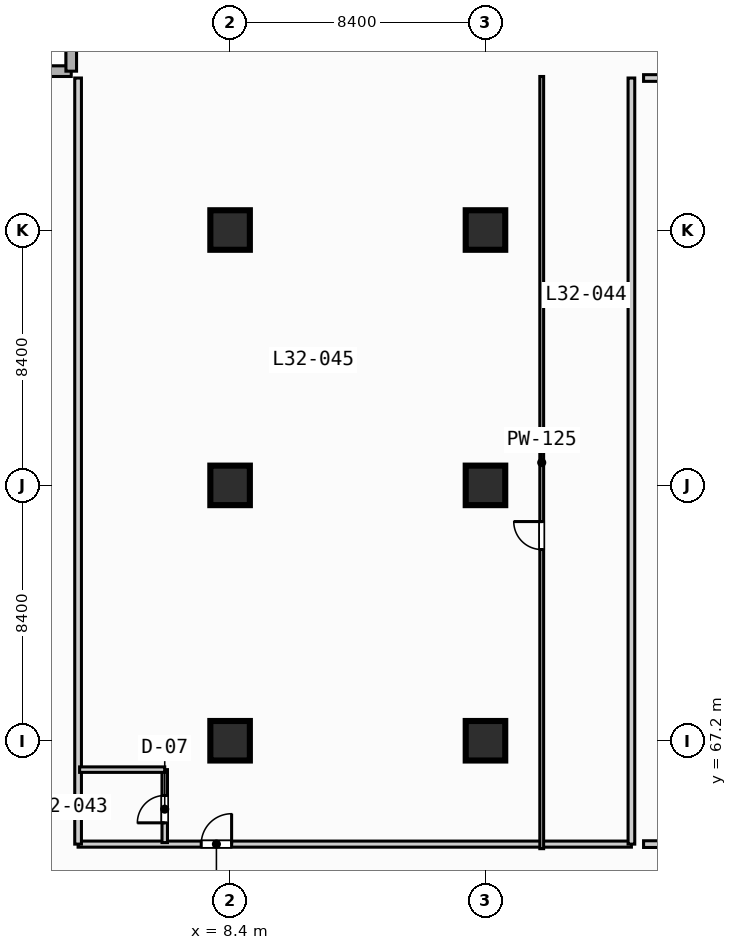
"""IFC4 building model, lengths in metres.
Left out: names, types, materials, properties, quantities, classifications, styles, units other than length and angle.
Written with IfcOpenShell. Run it as: python <this file> out.ifc"""

import sys

from ifc_helpers import new_model, si_unit, direction, frame, frame_2d, origin, origin_2d, place, context, subcontext, project, spatial, rectangle, extrude, element, fill, save


model = new_model("IFC4")
c1 = context("Model", 3, precision=1e-05, world=origin(), true_north=direction((0.0, 1.0)))
c2 = subcontext(c1, "Body", "Model", "MODEL_VIEW")
j1 = project(units=[si_unit("LENGTHUNIT", "METRE"), si_unit("PLANEANGLEUNIT", "RADIAN")], contexts=[c1])
p1 = place(None, origin())
s1 = spatial("IfcSite", under=j1, at=p1, CompositionType="ELEMENT")
p2 = place(p1, origin())
s2 = spatial("IfcBuilding", under=s1, at=p2, CompositionType="ELEMENT")
p3 = place(p2, frame((0.0, 0.0, 134.2)))
s3 = spatial("IfcBuildingStorey", under=s2, at=p3, CompositionType="ELEMENT", Elevation=134.2)
for number, where, z_axis, x_axis in (
    (1, (8.4, 67.2, 0.0), (0.0, 0.0, 1.0), (1.0, 0.0, 0.0)),
    (2, (8.4, 75.6, 0.0), (0.0, 0.0, 1.0), (1.0, 0.0, 0.0)),
    (3, (8.4, 84.0, 0.0), (0.0, 0.0, 1.0), (1.0, 0.0, 0.0)),
    (4, (16.8, 67.2, 0.0), (0.0, 0.0, 1.0), (1.0, 0.0, 0.0)),
    (5, (16.8, 75.6, 0.0), (0.0, 0.0, 1.0), (1.0, 0.0, 0.0)),
    (6, (16.8, 84.0, 0.0), (0.0, 0.0, 1.0), (1.0, 0.0, 0.0)),
):
    element("IfcColumn", number, at=place(p3, frame(where, z_axis=z_axis, x_axis=x_axis)), inside=s3, PredefinedType="COLUMN", context=c2, shape_type="SweptSolid", body=[
        extrude(rectangle(XDim=1.3, YDim=1.3, at=origin_2d()), origin(), (0.0, 0.0, 1.0), 3.8),
    ])
for number, where, z_axis, x_axis in (
    (7, (0.175, 89.225, 0.0), (0.0, 0.0, 1.0), (1.0, 0.0, 0.0)),
    (8, (3.175, 89.225, 0.0), (0.0, 0.0, 1.0), (0.0, 1.0, 0.0)),
):
    element("IfcWall", number, at=place(p3, frame(where, z_axis=z_axis, x_axis=x_axis)), inside=s3, PredefinedType="STANDARD", context=c2, shape_type="SweptSolid", body=[
        extrude(rectangle(XDim=3.0, YDim=0.35, at=frame_2d((1.5, 0.0))), origin(), (0.0, 0.0, 1.0), 3.55),
    ])
p4 = place(p3, frame((3.4, 63.8, 0.0), z_axis=(0.0, 0.0, 1.0), x_axis=(1.0, 0.0, 0.0)))
e9 = element("IfcWall", 9, at=p4, inside=s3, PredefinedType="PARTITIONING", context=c2, shape_type="SweptSolid", body=[
    extrude(rectangle(XDim=18.2, YDim=0.2, at=frame_2d((9.1, 0.0))), origin(), (0.0, 0.0, 1.0), 3.55),
])
p5 = place(p4, frame((4.05, 0.0, 0.0)))
e10 = element("IfcOpeningElement", 10, at=p5, cuts=e9, PredefinedType="OPENING", context=c2, shape_type="SweptSolid", body=[
    extrude(rectangle(XDim=1.0, YDim=2.15, at=frame_2d((0.5, 1.075))), frame((0.0, 0.11, 0.0), z_axis=(0.0, -1.0, 0.0), x_axis=(1.0, 0.0, 0.0)), (0.0, 0.0, 1.0), 0.22),
])
for number, where, z_axis, x_axis in (
    (11, (21.6, 63.8, 0.0), (0.0, 0.0, 1.0), (0.0, 1.0, 0.0)),
    (12, (3.4, 63.8, 0.0), (0.0, 0.0, 1.0), (0.0, 1.0, 0.0)),
):
    element("IfcWall", number, at=place(p3, frame(where, z_axis=z_axis, x_axis=x_axis)), inside=s3, PredefinedType="PARTITIONING", context=c2, shape_type="SweptSolid", body=[
        extrude(rectangle(XDim=25.2, YDim=0.22, at=frame_2d((12.6, 0.0))), origin(), (0.0, 0.0, 1.0), 3.55),
    ])
p6 = place(p3, frame((6.25, 63.85, 0.0), z_axis=(0.0, 0.0, 1.0), x_axis=(0.0, 1.0, 0.0)))
e13 = element("IfcWall", 13, at=p6, inside=s3, PredefinedType="PLUMBINGWALL", context=c2, shape_type="SweptSolid", body=[
    extrude(rectangle(XDim=2.4, YDim=0.18, at=frame_2d((1.2, 0.0))), origin(), (0.0, 0.0, 1.0), 3.55),
])
p7 = place(p6, frame((0.65, 0.0, 0.0)))
e14 = element("IfcOpeningElement", 14, at=p7, cuts=e13, PredefinedType="OPENING", context=c2, shape_type="SweptSolid", body=[
    extrude(rectangle(XDim=0.9, YDim=2.1, at=frame_2d((0.45, 1.05))), frame((0.0, 0.1, 0.0), z_axis=(0.0, -1.0, 0.0), x_axis=(1.0, 0.0, 0.0)), (0.0, 0.0, 1.0), 0.2),
])
p8 = place(p3, frame((3.45, 66.25, 0.0), z_axis=(0.0, 0.0, 1.0), x_axis=(1.0, 0.0, 0.0)))
e15 = element("IfcWall", 15, at=p8, inside=s3, PredefinedType="PLUMBINGWALL", context=c2, shape_type="SweptSolid", body=[
    extrude(rectangle(XDim=2.8, YDim=0.18, at=frame_2d((1.4, 0.0))), origin(), (0.0, 0.0, 1.0), 3.55),
])
p9 = place(p3, frame((18.65, 63.65, 0.0), z_axis=(0.0, 0.0, 1.0), x_axis=(0.0, 1.0, 0.0)))
e16 = element("IfcWall", 16, at=p9, inside=s3, PredefinedType="PARTITIONING", context=c2, shape_type="SweptSolid", body=[
    extrude(rectangle(XDim=25.4, YDim=0.125, at=frame_2d((12.7, 0.0))), origin(), (0.0, 0.0, 1.0), 3.55),
])
p10 = place(p9, frame((9.84, 0.0, 0.0)))
e17 = element("IfcOpeningElement", 17, at=p10, cuts=e16, PredefinedType="OPENING", context=c2, shape_type="SweptSolid", body=[
    extrude(rectangle(XDim=0.92, YDim=2.1, at=frame_2d((0.46, 1.05))), frame((0.0, 0.073, 0.0), z_axis=(0.0, -1.0, 0.0), x_axis=(1.0, 0.0, 0.0)), (0.0, 0.0, 1.0), 0.145),
])
p11 = place(p3, frame((22.0, 89.0, 0.0), z_axis=(0.0, 0.0, 1.0), x_axis=(1.0, 0.0, 0.0)))
e18 = element("IfcWall", 18, at=p11, inside=s3, PredefinedType="PARTITIONING", context=c2, shape_type="SweptSolid", body=[
    extrude(rectangle(XDim=11.3, YDim=0.22, at=frame_2d((5.65, 0.0))), origin(), (0.0, 0.0, 1.0), 3.55),
])
p12 = place(p3, frame((22.0, 63.8, 0.0), z_axis=(0.0, 0.0, 1.0), x_axis=(1.0, 0.0, 0.0)))
e19 = element("IfcWall", 19, at=p12, inside=s3, PredefinedType="PARTITIONING", context=c2, shape_type="SweptSolid", body=[
    extrude(rectangle(XDim=6.0, YDim=0.22, at=frame_2d((3.0, 0.0))), origin(), (0.0, 0.0, 1.0), 3.55),
])
p13 = place(p5, origin())
e20 = element("IfcDoor", 20, at=p13, inside=s3, OperationType="SINGLE_SWING_RIGHT", PredefinedType="DOOR", context=c2, shape_type="SweptSolid", body=[
    extrude(rectangle(XDim=1.0, YDim=2.15, at=frame_2d((0.5, 1.075))), frame((0.0, 0.025, 0.0), z_axis=(0.0, -1.0, 0.0), x_axis=(1.0, 0.0, 0.0)), (0.0, 0.0, 1.0), 0.05),
])
fill(e10, e20)
p14 = place(p7, origin())
e21 = element("IfcDoor", 21, at=p14, inside=s3, OperationType="SINGLE_SWING_LEFT", PredefinedType="DOOR", context=c2, shape_type="SweptSolid", body=[
    extrude(rectangle(XDim=0.9, YDim=2.1, at=frame_2d((0.45, 1.05))), frame((0.0, 0.025, 0.0), z_axis=(0.0, -1.0, 0.0), x_axis=(1.0, 0.0, 0.0)), (0.0, 0.0, 1.0), 0.05),
])
fill(e14, e21)
p15 = place(p10, origin())
e22 = element("IfcDoor", 22, at=p15, inside=s3, OperationType="SINGLE_SWING_RIGHT", PredefinedType="DOOR", context=c2, shape_type="SweptSolid", body=[
    extrude(rectangle(XDim=0.92, YDim=2.1, at=frame_2d((0.46, 1.05))), frame((0.0, 0.025, 0.0), z_axis=(0.0, -1.0, 0.0), x_axis=(1.0, 0.0, 0.0)), (0.0, 0.0, 1.0), 0.05),
])
fill(e17, e22)
save(model, sys.argv[1])
